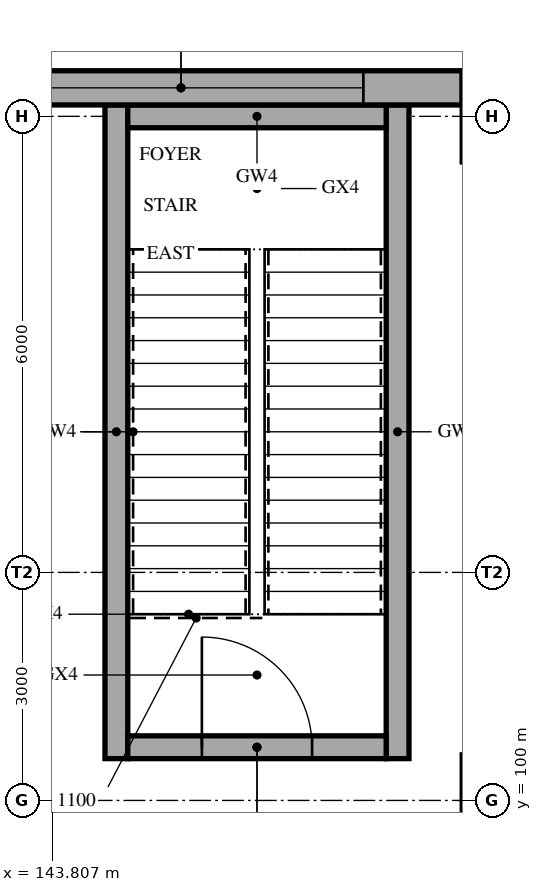
"""IFC4 building model, lengths in metres.
Left out: names, types, materials, properties, quantities, classifications, styles, units other than length and angle.
Written with IfcOpenShell. Run it as: python <this file> out.ifc"""

import sys

from ifc_helpers import new_model, si_unit, direction, frame, frame_2d, origin, place, context, subcontext, project, spatial, rectangle, extrude, element, fill, save


model = new_model("IFC4")
c1 = context("Model", 3, precision=1e-05, world=origin(), true_north=direction((0.0, 1.0)))
c2 = subcontext(c1, "Body", "Model", "MODEL_VIEW")
j1 = project(units=[si_unit("LENGTHUNIT", "METRE"), si_unit("PLANEANGLEUNIT", "RADIAN")], contexts=[c1])
p1 = place(None, origin())
s1 = spatial("IfcSite", under=j1, at=p1, CompositionType="ELEMENT")
p2 = place(p1, origin())
s2 = spatial("IfcBuilding", under=s1, at=p2, CompositionType="ELEMENT")
p3 = place(p2, frame((0.0, 0.0, 5.0)))
s3 = spatial("IfcBuildingStorey", under=s2, at=p3, CompositionType="ELEMENT", Elevation=5.0)
for number, where, z_axis, x_axis in (
    (1, (144.65, 100.55, 0.0), (0.0, 0.0, 1.0), (0.0, 1.0, 0.0)),
    (2, (148.35, 100.55, 0.0), (0.0, 0.0, 1.0), (0.0, 1.0, 0.0)),
):
    element("IfcWall", number, at=place(p3, frame(where, z_axis=z_axis, x_axis=x_axis)), inside=s3, PredefinedType="SHEAR", context=c2, shape_type="SweptSolid", body=[
        extrude(rectangle(XDim=8.6, YDim=0.3, at=frame_2d((4.3, 0.0))), origin(), (0.0, 0.0, 1.0), 5.0),
    ])
p4 = place(p3, frame((144.8, 100.7, 0.0), z_axis=(0.0, 0.0, 1.0), x_axis=(1.0, 0.0, 0.0)))
e3 = element("IfcWall", 3, at=p4, inside=s3, PredefinedType="SHEAR", context=c2, shape_type="SweptSolid", body=[
    extrude(rectangle(XDim=3.4, YDim=0.3, at=frame_2d((1.7, 0.0))), origin(), (0.0, 0.0, 1.0), 5.0),
])
p5 = place(p4, frame((0.975, 0.0, 0.0)))
e4 = element("IfcOpeningElement", 4, at=p5, cuts=e3, PredefinedType="OPENING", context=c2, shape_type="SweptSolid", body=[
    extrude(rectangle(XDim=1.45, YDim=2.1, at=frame_2d((0.725, 1.05))), frame((0.0, 0.16, 0.0), z_axis=(0.0, -1.0, 0.0), x_axis=(1.0, 0.0, 0.0)), (0.0, 0.0, 1.0), 0.32),
])
p6 = place(p3, frame((144.8, 109.0, 0.0), z_axis=(0.0, 0.0, 1.0), x_axis=(1.0, 0.0, 0.0)))
e5 = element("IfcWall", 5, at=p6, inside=s3, PredefinedType="SHEAR", context=c2, shape_type="SweptSolid", body=[
    extrude(rectangle(XDim=3.4, YDim=0.3, at=frame_2d((1.7, 0.0))), origin(), (0.0, 0.0, 1.0), 5.0),
])
p7 = place(p3, frame((141.8, 109.375, 0.0), z_axis=(0.0, 0.0, 1.0), x_axis=(1.0, 0.0, 0.0)))
e6 = element("IfcWall", 6, at=p7, inside=s3, PredefinedType="SOLIDWALL", context=c2, shape_type="SweptSolid", body=[
    extrude(rectangle(XDim=7.4, YDim=0.45, at=frame_2d((3.7, 0.0))), origin(), (0.0, 0.0, 1.0), 5.0),
])
p8 = place(p7, frame((1.3, 0.0, 0.9)))
e7 = element("IfcOpeningElement", 7, at=p8, cuts=e6, PredefinedType="OPENING", context=c2, shape_type="SweptSolid", body=[
    extrude(rectangle(XDim=4.8, YDim=3.0, at=frame_2d((2.4, 1.5))), frame((0.0, 0.235, 0.0), z_axis=(0.0, -1.0, 0.0), x_axis=(1.0, 0.0, 0.0)), (0.0, 0.0, 1.0), 0.47),
])
p9 = place(p8, origin())
e8 = element("IfcWindow", 8, at=p9, inside=s3, PartitioningType="SINGLE_PANEL", PredefinedType="WINDOW", context=c2, shape_type="SweptSolid", body=[
    extrude(rectangle(XDim=4.8, YDim=3.0, at=frame_2d((2.4, 1.5))), frame((0.0, 0.03, 0.0), z_axis=(0.0, -1.0, 0.0), x_axis=(1.0, 0.0, 0.0)), (0.0, 0.0, 1.0), 0.06),
])
fill(e7, e8)
p10 = place(p5, origin())
e9 = element("IfcDoor", 9, at=p10, inside=s3, OperationType="SINGLE_SWING_LEFT", PredefinedType="DOOR", context=c2, shape_type="SweptSolid", body=[
    extrude(rectangle(XDim=1.45, YDim=2.1, at=frame_2d((0.725, 1.05))), frame((0.0, 0.025, 0.0), z_axis=(0.0, -1.0, 0.0), x_axis=(1.0, 0.0, 0.0)), (0.0, 0.0, 1.0), 0.05),
])
fill(e4, e9)
save(model, sys.argv[1])
